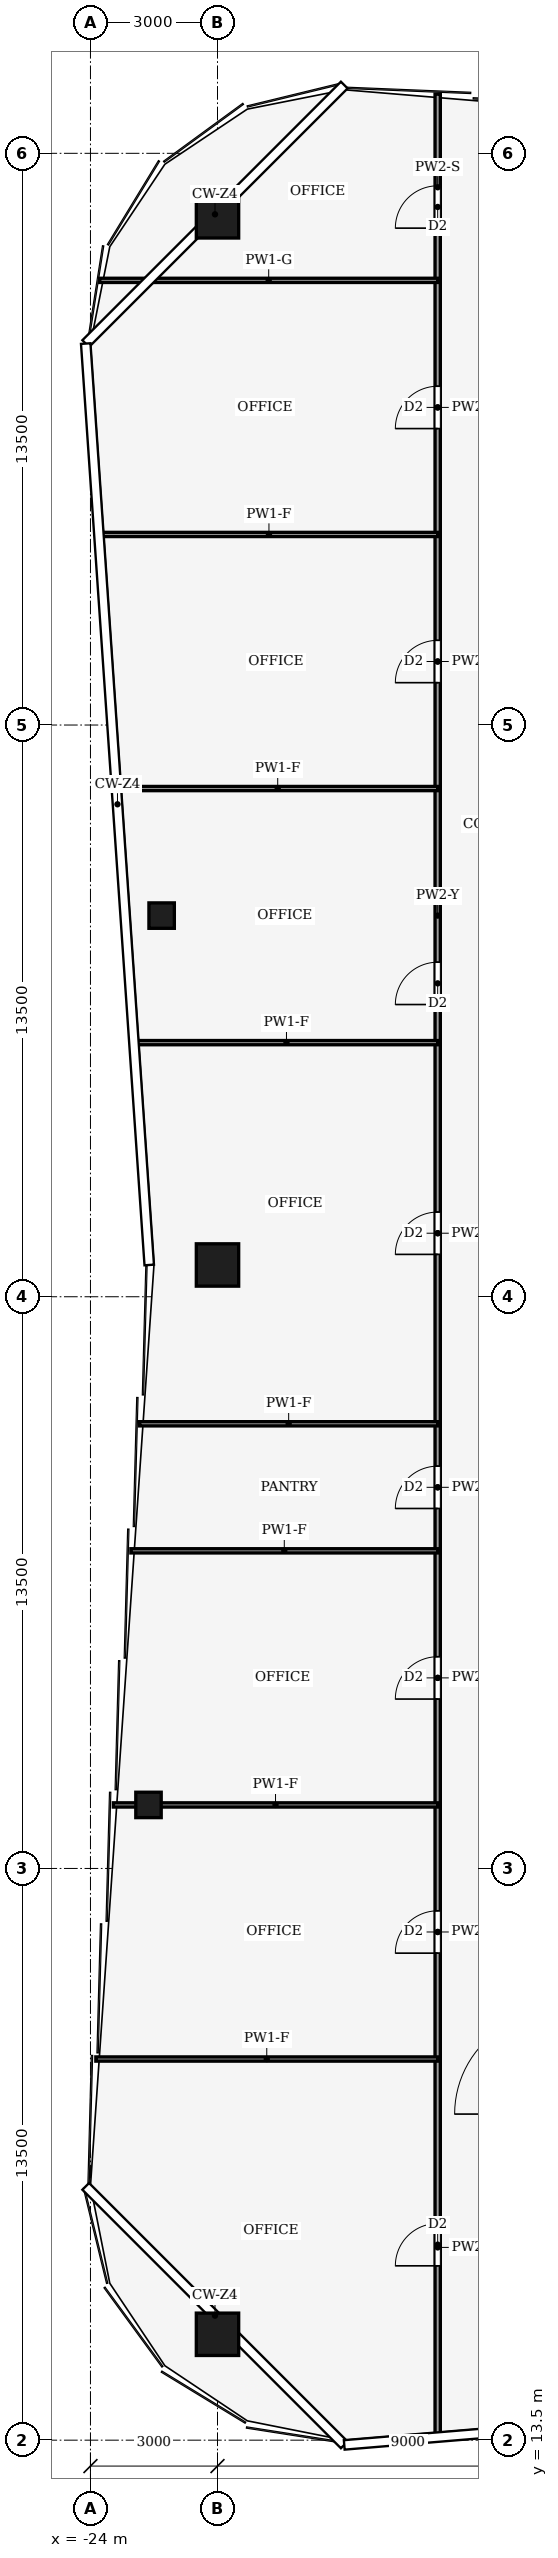
"""IFC4 building model, lengths in metres.
Left out: names, types, materials, properties, quantities, classifications, styles, units other than length and angle.
Written with IfcOpenShell. Run it as: python <this file> out.ifc"""

import sys

from ifc_helpers import new_model, si_unit, direction, frame, frame_2d, origin, origin_2d, place, context, subcontext, project, spatial, rectangle, hollow_rectangle, extrude, element, fill, save


model = new_model("IFC4")
c1 = context("Model", 3, precision=1e-05, world=origin(), true_north=direction((0.0, 1.0)))
c2 = subcontext(c1, "Body", "Model", "MODEL_VIEW")
j1 = project(units=[si_unit("LENGTHUNIT", "METRE"), si_unit("PLANEANGLEUNIT", "RADIAN")], contexts=[c1])
p1 = place(None, origin())
s1 = spatial("IfcSite", under=j1, at=p1, CompositionType="ELEMENT")
p2 = place(p1, origin())
s2 = spatial("IfcBuilding", under=s1, at=p2, CompositionType="ELEMENT")
p3 = place(p2, frame((0.0, 0.0, 266.0)))
s3 = spatial("IfcBuildingStorey", under=s2, at=p3, CompositionType="ELEMENT", Elevation=266.0)
for number, where, z_axis, x_axis in (
    (1, (-21.0, 66.0, 0.0), (0.0, 0.0, 1.0), (1.0, 0.0, 0.0)),
    (2, (-21.0, 16.0, 0.0), (0.0, 0.0, 1.0), (1.0, 0.0, 0.0)),
    (3, (-21.0, 41.25, 0.0), (0.0, 0.0, 1.0), (1.0, 0.0, 0.0)),
):
    element("IfcColumn", number, at=place(p3, frame(where, z_axis=z_axis, x_axis=x_axis)), inside=s3, PredefinedType="COLUMN", context=c2, shape_type="SweptSolid", body=[
        extrude(hollow_rectangle(XDim=1.0, YDim=1.0, WallThickness=0.045, at=origin_2d()), origin(), (0.0, 0.0, 1.0), 4.0),
    ])
for number, where, z_axis, x_axis in (
    (4, (-22.629, 28.5, 0.0), (0.0, 0.0, 1.0), (1.0, 0.0, 0.0)),
    (5, (-22.319, 49.5, 0.0), (0.0, 0.0, 1.0), (1.0, 0.0, 0.0)),
):
    element("IfcColumn", number, at=place(p3, frame(where, z_axis=z_axis, x_axis=x_axis)), inside=s3, PredefinedType="COLUMN", context=c2, shape_type="SweptSolid", body=[
        extrude(hollow_rectangle(XDim=0.6, YDim=0.6, WallThickness=0.025, at=origin_2d()), origin(), (0.0, 0.0, 1.0), 4.0),
    ])
p4 = place(p3, frame((-15.8, 13.603, 0.0), z_axis=(0.0, 0.0, 1.0), x_axis=(0.0, 1.0, 0.0)))
e6 = element("IfcWall", 6, at=p4, inside=s3, PredefinedType="PARTITIONING", context=c2, shape_type="SweptSolid", body=[
    extrude(rectangle(XDim=8.897, YDim=0.125, at=frame_2d((4.448, 0.0))), origin(), (0.0, 0.0, 1.0), 3.04),
])
p5 = place(p4, frame((4.013, 0.0, 0.0)))
e7 = element("IfcOpeningElement", 7, at=p5, cuts=e6, PredefinedType="OPENING", context=c2, shape_type="SweptSolid", body=[
    extrude(rectangle(XDim=1.0, YDim=2.1, at=frame_2d((0.5, 1.05))), frame((0.0, 0.073, 0.0), z_axis=(0.0, -1.0, 0.0), x_axis=(1.0, 0.0, 0.0)), (0.0, 0.0, 1.0), 0.145),
])
p6 = place(p3, frame((-15.8, 22.5, 0.0), z_axis=(0.0, 0.0, 1.0), x_axis=(0.0, 1.0, 0.0)))
e8 = element("IfcWall", 8, at=p6, inside=s3, PredefinedType="PARTITIONING", context=c2, shape_type="SweptSolid", body=[
    extrude(rectangle(XDim=6.0, YDim=0.125, at=frame_2d((3.0, 0.0))), origin(), (0.0, 0.0, 1.0), 3.44),
])
p7 = place(p6, frame((2.5, 0.0, 0.0)))
e9 = element("IfcOpeningElement", 9, at=p7, cuts=e8, PredefinedType="OPENING", context=c2, shape_type="SweptSolid", body=[
    extrude(rectangle(XDim=1.0, YDim=2.1, at=frame_2d((0.5, 1.05))), frame((0.0, 0.073, 0.0), z_axis=(0.0, -1.0, 0.0), x_axis=(1.0, 0.0, 0.0)), (0.0, 0.0, 1.0), 0.145),
])
p8 = place(p3, frame((-15.8, 28.5, 0.0), z_axis=(0.0, 0.0, 1.0), x_axis=(0.0, 1.0, 0.0)))
e10 = element("IfcWall", 10, at=p8, inside=s3, PredefinedType="PARTITIONING", context=c2, shape_type="SweptSolid", body=[
    extrude(rectangle(XDim=6.0, YDim=0.125, at=frame_2d((3.0, 0.0))), origin(), (0.0, 0.0, 1.0), 3.48),
])
p9 = place(p8, frame((2.5, 0.0, 0.0)))
e11 = element("IfcOpeningElement", 11, at=p9, cuts=e10, PredefinedType="OPENING", context=c2, shape_type="SweptSolid", body=[
    extrude(rectangle(XDim=1.0, YDim=2.1, at=frame_2d((0.5, 1.05))), frame((0.0, 0.073, 0.0), z_axis=(0.0, -1.0, 0.0), x_axis=(1.0, 0.0, 0.0)), (0.0, 0.0, 1.0), 0.145),
])
p10 = place(p3, frame((-15.8, 34.5, 0.0), z_axis=(0.0, 0.0, 1.0), x_axis=(0.0, 1.0, 0.0)))
e12 = element("IfcWall", 12, at=p10, inside=s3, PredefinedType="PARTITIONING", context=c2, shape_type="SweptSolid", body=[
    extrude(rectangle(XDim=3.0, YDim=0.125, at=frame_2d((1.5, 0.0))), origin(), (0.0, 0.0, 1.0), 3.48),
])
p11 = place(p10, frame((1.0, 0.0, 0.0)))
e13 = element("IfcOpeningElement", 13, at=p11, cuts=e12, PredefinedType="OPENING", context=c2, shape_type="SweptSolid", body=[
    extrude(rectangle(XDim=1.0, YDim=2.1, at=frame_2d((0.5, 1.05))), frame((0.0, 0.073, 0.0), z_axis=(0.0, -1.0, 0.0), x_axis=(1.0, 0.0, 0.0)), (0.0, 0.0, 1.0), 0.145),
])
p12 = place(p3, frame((-15.8, 37.5, 0.0), z_axis=(0.0, 0.0, 1.0), x_axis=(0.0, 1.0, 0.0)))
e14 = element("IfcWall", 14, at=p12, inside=s3, PredefinedType="PARTITIONING", context=c2, shape_type="SweptSolid", body=[
    extrude(rectangle(XDim=9.0, YDim=0.125, at=frame_2d((4.5, 0.0))), origin(), (0.0, 0.0, 1.0), 3.14),
])
p13 = place(p12, frame((4.0, 0.0, 0.0)))
e15 = element("IfcOpeningElement", 15, at=p13, cuts=e14, PredefinedType="OPENING", context=c2, shape_type="SweptSolid", body=[
    extrude(rectangle(XDim=1.0, YDim=2.1, at=frame_2d((0.5, 1.05))), frame((0.0, 0.073, 0.0), z_axis=(0.0, -1.0, 0.0), x_axis=(1.0, 0.0, 0.0)), (0.0, 0.0, 1.0), 0.145),
])
p14 = place(p3, frame((-15.8, 46.5, 0.0), z_axis=(0.0, 0.0, 1.0), x_axis=(0.0, 1.0, 0.0)))
e16 = element("IfcWall", 16, at=p14, inside=s3, PredefinedType="PARTITIONING", context=c2, shape_type="SweptSolid", body=[
    extrude(rectangle(XDim=6.0, YDim=0.125, at=frame_2d((3.0, 0.0))), origin(), (0.0, 0.0, 1.0), 3.24),
])
p15 = place(p14, frame((0.9, 0.0, 0.0)))
e17 = element("IfcOpeningElement", 17, at=p15, cuts=e16, PredefinedType="OPENING", context=c2, shape_type="SweptSolid", body=[
    extrude(rectangle(XDim=1.0, YDim=2.1, at=frame_2d((0.5, 1.05))), frame((0.0, 0.073, 0.0), z_axis=(0.0, -1.0, 0.0), x_axis=(1.0, 0.0, 0.0)), (0.0, 0.0, 1.0), 0.145),
])
p16 = place(p3, frame((-15.8, 52.5, 0.0), z_axis=(0.0, 0.0, 1.0), x_axis=(0.0, 1.0, 0.0)))
e18 = element("IfcWall", 18, at=p16, inside=s3, PredefinedType="PARTITIONING", context=c2, shape_type="SweptSolid", body=[
    extrude(rectangle(XDim=6.0, YDim=0.125, at=frame_2d((3.0, 0.0))), origin(), (0.0, 0.0, 1.0), 3.87),
])
p17 = place(p16, frame((2.5, 0.0, 0.0)))
e19 = element("IfcOpeningElement", 19, at=p17, cuts=e18, PredefinedType="OPENING", context=c2, shape_type="SweptSolid", body=[
    extrude(rectangle(XDim=1.0, YDim=2.1, at=frame_2d((0.5, 1.05))), frame((0.0, 0.073, 0.0), z_axis=(0.0, -1.0, 0.0), x_axis=(1.0, 0.0, 0.0)), (0.0, 0.0, 1.0), 0.145),
])
p18 = place(p3, frame((-15.8, 58.5, 0.0), z_axis=(0.0, 0.0, 1.0), x_axis=(0.0, 1.0, 0.0)))
e20 = element("IfcWall", 20, at=p18, inside=s3, PredefinedType="PARTITIONING", context=c2, shape_type="SweptSolid", body=[
    extrude(rectangle(XDim=6.0, YDim=0.125, at=frame_2d((3.0, 0.0))), origin(), (0.0, 0.0, 1.0), 3.87),
])
p19 = place(p18, frame((2.5, 0.0, 0.0)))
e21 = element("IfcOpeningElement", 21, at=p19, cuts=e20, PredefinedType="OPENING", context=c2, shape_type="SweptSolid", body=[
    extrude(rectangle(XDim=1.0, YDim=2.1, at=frame_2d((0.5, 1.05))), frame((0.0, 0.073, 0.0), z_axis=(0.0, -1.0, 0.0), x_axis=(1.0, 0.0, 0.0)), (0.0, 0.0, 1.0), 0.145),
])
p20 = place(p3, frame((-15.8, 64.5, 0.0), z_axis=(0.0, 0.0, 1.0), x_axis=(0.0, 1.0, 0.0)))
e22 = element("IfcWall", 22, at=p20, inside=s3, PredefinedType="PARTITIONING", context=c2, shape_type="SweptSolid", body=[
    extrude(rectangle(XDim=4.397, YDim=0.125, at=frame_2d((2.198, 0.0))), origin(), (0.0, 0.0, 1.0), 3.04),
])
p21 = place(p20, frame((1.233, 0.0, 0.0)))
e23 = element("IfcOpeningElement", 23, at=p21, cuts=e22, PredefinedType="OPENING", context=c2, shape_type="SweptSolid", body=[
    extrude(rectangle(XDim=1.0, YDim=2.1, at=frame_2d((0.5, 1.05))), frame((0.0, 0.073, 0.0), z_axis=(0.0, -1.0, 0.0), x_axis=(1.0, 0.0, 0.0)), (0.0, 0.0, 1.0), 0.145),
])
p22 = place(p3, frame((-15.8, 22.5, 0.0), z_axis=(0.0, 0.0, 1.0), x_axis=(-1.0, 0.0, 0.0)))
e24 = element("IfcWall", 24, at=p22, inside=s3, PredefinedType="PARTITIONING", context=c2, shape_type="SweptSolid", body=[
    extrude(rectangle(XDim=8.073, YDim=0.1, at=frame_2d((4.037, 0.0))), origin(), (0.0, 0.0, 1.0), 3.04),
])
p23 = place(p3, frame((-15.8, 28.5, 0.0), z_axis=(0.0, 0.0, 1.0), x_axis=(-1.0, 0.0, 0.0)))
e25 = element("IfcWall", 25, at=p23, inside=s3, PredefinedType="PARTITIONING", context=c2, shape_type="SweptSolid", body=[
    extrude(rectangle(XDim=7.659, YDim=0.1, at=frame_2d((3.83, 0.0))), origin(), (0.0, 0.0, 1.0), 3.04),
])
p24 = place(p3, frame((-15.8, 34.5, 0.0), z_axis=(0.0, 0.0, 1.0), x_axis=(-1.0, 0.0, 0.0)))
e26 = element("IfcWall", 26, at=p24, inside=s3, PredefinedType="PARTITIONING", context=c2, shape_type="SweptSolid", body=[
    extrude(rectangle(XDim=7.245, YDim=0.1, at=frame_2d((3.623, 0.0))), origin(), (0.0, 0.0, 1.0), 3.04),
])
p25 = place(p3, frame((-15.8, 37.5, 0.0), z_axis=(0.0, 0.0, 1.0), x_axis=(-1.0, 0.0, 0.0)))
e27 = element("IfcWall", 27, at=p25, inside=s3, PredefinedType="PARTITIONING", context=c2, shape_type="SweptSolid", body=[
    extrude(rectangle(XDim=7.039, YDim=0.1, at=frame_2d((3.519, 0.0))), origin(), (0.0, 0.0, 1.0), 3.04),
])
p26 = place(p3, frame((-15.8, 46.5, 0.0), z_axis=(0.0, 0.0, 1.0), x_axis=(-1.0, 0.0, 0.0)))
e28 = element("IfcWall", 28, at=p26, inside=s3, PredefinedType="PARTITIONING", context=c2, shape_type="SweptSolid", body=[
    extrude(rectangle(XDim=7.142, YDim=0.1, at=frame_2d((3.571, 0.0))), origin(), (0.0, 0.0, 1.0), 3.04),
])
p27 = place(p3, frame((-15.8, 52.5, 0.0), z_axis=(0.0, 0.0, 1.0), x_axis=(-1.0, 0.0, 0.0)))
e29 = element("IfcWall", 29, at=p27, inside=s3, PredefinedType="PARTITIONING", context=c2, shape_type="SweptSolid", body=[
    extrude(rectangle(XDim=7.556, YDim=0.1, at=frame_2d((3.778, 0.0))), origin(), (0.0, 0.0, 1.0), 3.04),
])
p28 = place(p3, frame((-15.8, 58.5, 0.0), z_axis=(0.0, 0.0, 1.0), x_axis=(-1.0, 0.0, 0.0)))
e30 = element("IfcWall", 30, at=p28, inside=s3, PredefinedType="PARTITIONING", context=c2, shape_type="SweptSolid", body=[
    extrude(rectangle(XDim=7.97, YDim=0.1, at=frame_2d((3.985, 0.0))), origin(), (0.0, 0.0, 1.0), 3.04),
])
p29 = place(p3, frame((-15.8, 64.5, 0.0), z_axis=(0.0, 0.0, 1.0), x_axis=(-1.0, 0.0, 0.0)))
e31 = element("IfcWall", 31, at=p29, inside=s3, PredefinedType="PARTITIONING", context=c2, shape_type="SweptSolid", body=[
    extrude(rectangle(XDim=7.981, YDim=0.1, at=frame_2d((3.991, 0.0))), origin(), (0.0, 0.0, 1.0), 2.93),
])
p30 = place(p5, origin())
e32 = element("IfcDoor", 32, at=p30, inside=s3, OperationType="SINGLE_SWING_RIGHT", PredefinedType="DOOR", context=c2, shape_type="SweptSolid", body=[
    extrude(rectangle(XDim=1.0, YDim=2.1, at=frame_2d((0.5, 1.05))), frame((0.0, 0.025, 0.0), z_axis=(0.0, -1.0, 0.0), x_axis=(1.0, 0.0, 0.0)), (0.0, 0.0, 1.0), 0.05),
])
fill(e7, e32)
p31 = place(p7, origin())
e33 = element("IfcDoor", 33, at=p31, inside=s3, OperationType="SINGLE_SWING_RIGHT", PredefinedType="DOOR", context=c2, shape_type="SweptSolid", body=[
    extrude(rectangle(XDim=1.0, YDim=2.1, at=frame_2d((0.5, 1.05))), frame((0.0, 0.025, 0.0), z_axis=(0.0, -1.0, 0.0), x_axis=(1.0, 0.0, 0.0)), (0.0, 0.0, 1.0), 0.05),
])
fill(e9, e33)
p32 = place(p9, origin())
e34 = element("IfcDoor", 34, at=p32, inside=s3, OperationType="SINGLE_SWING_LEFT", PredefinedType="DOOR", context=c2, shape_type="SweptSolid", body=[
    extrude(rectangle(XDim=1.0, YDim=2.1, at=frame_2d((0.5, 1.05))), frame((0.0, 0.025, 0.0), z_axis=(0.0, -1.0, 0.0), x_axis=(1.0, 0.0, 0.0)), (0.0, 0.0, 1.0), 0.05),
])
fill(e11, e34)
p33 = place(p11, origin())
e35 = element("IfcDoor", 35, at=p33, inside=s3, OperationType="SINGLE_SWING_RIGHT", PredefinedType="DOOR", context=c2, shape_type="SweptSolid", body=[
    extrude(rectangle(XDim=1.0, YDim=2.1, at=frame_2d((0.5, 1.05))), frame((0.0, 0.025, 0.0), z_axis=(0.0, -1.0, 0.0), x_axis=(1.0, 0.0, 0.0)), (0.0, 0.0, 1.0), 0.05),
])
fill(e13, e35)
p34 = place(p13, origin())
e36 = element("IfcDoor", 36, at=p34, inside=s3, OperationType="SINGLE_SWING_LEFT", PredefinedType="DOOR", context=c2, shape_type="SweptSolid", body=[
    extrude(rectangle(XDim=1.0, YDim=2.1, at=frame_2d((0.5, 1.05))), frame((0.0, 0.025, 0.0), z_axis=(0.0, -1.0, 0.0), x_axis=(1.0, 0.0, 0.0)), (0.0, 0.0, 1.0), 0.05),
])
fill(e15, e36)
p35 = place(p15, origin())
e37 = element("IfcDoor", 37, at=p35, inside=s3, OperationType="SINGLE_SWING_LEFT", PredefinedType="DOOR", context=c2, shape_type="SweptSolid", body=[
    extrude(rectangle(XDim=1.0, YDim=2.1, at=frame_2d((0.5, 1.05))), frame((0.0, 0.025, 0.0), z_axis=(0.0, -1.0, 0.0), x_axis=(1.0, 0.0, 0.0)), (0.0, 0.0, 1.0), 0.05),
])
fill(e17, e37)
p36 = place(p17, origin())
e38 = element("IfcDoor", 38, at=p36, inside=s3, OperationType="SINGLE_SWING_LEFT", PredefinedType="DOOR", context=c2, shape_type="SweptSolid", body=[
    extrude(rectangle(XDim=1.0, YDim=2.1, at=frame_2d((0.5, 1.05))), frame((0.0, 0.025, 0.0), z_axis=(0.0, -1.0, 0.0), x_axis=(1.0, 0.0, 0.0)), (0.0, 0.0, 1.0), 0.05),
])
fill(e19, e38)
p37 = place(p19, origin())
e39 = element("IfcDoor", 39, at=p37, inside=s3, OperationType="SINGLE_SWING_RIGHT", PredefinedType="DOOR", context=c2, shape_type="SweptSolid", body=[
    extrude(rectangle(XDim=1.0, YDim=2.1, at=frame_2d((0.5, 1.05))), frame((0.0, 0.025, 0.0), z_axis=(0.0, -1.0, 0.0), x_axis=(1.0, 0.0, 0.0)), (0.0, 0.0, 1.0), 0.05),
])
fill(e21, e39)
p38 = place(p21, origin())
e40 = element("IfcDoor", 40, at=p38, inside=s3, OperationType="SINGLE_SWING_LEFT", PredefinedType="DOOR", context=c2, shape_type="SweptSolid", body=[
    extrude(rectangle(XDim=1.0, YDim=2.1, at=frame_2d((0.5, 1.05))), frame((0.0, 0.025, 0.0), z_axis=(0.0, -1.0, 0.0), x_axis=(1.0, 0.0, 0.0)), (0.0, 0.0, 1.0), 0.05),
])
fill(e23, e40)
save(model, sys.argv[1])
